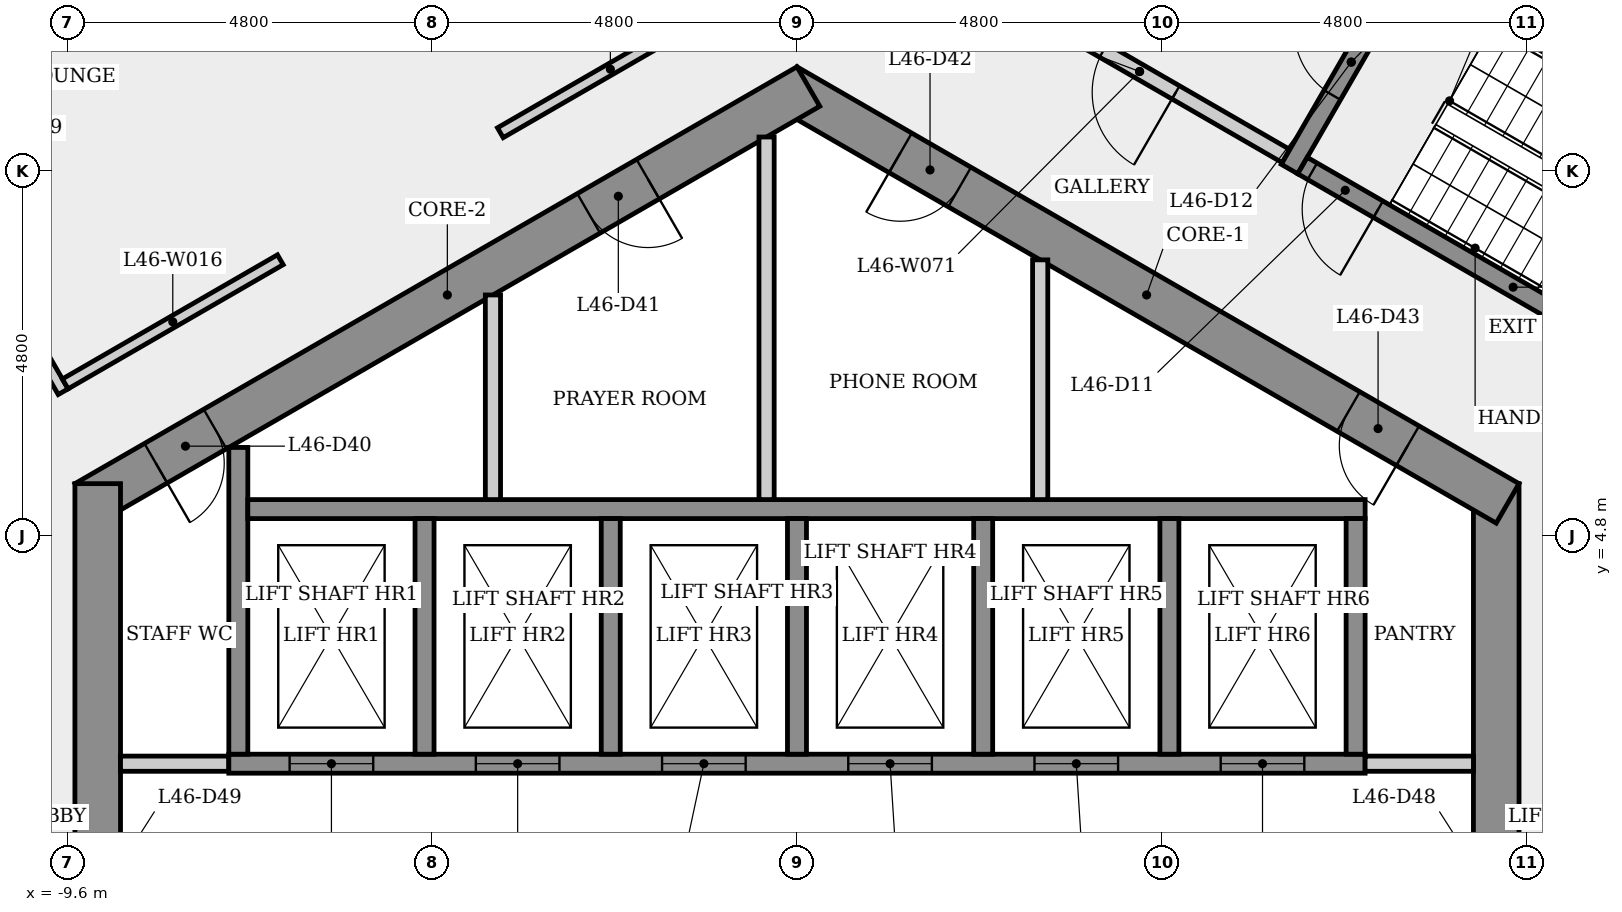
"""IFC4 building model, lengths in metres.
Left out: names, types, materials, properties, quantities, classifications, styles, units other than length and angle.
Written with IfcOpenShell. Run it as: python <this file> out.ifc"""

import sys

from ifc_helpers import new_model, si_unit, direction, frame, frame_2d, origin, place, context, subcontext, project, spatial, rectangle, extrude, element, fill, save


model = new_model("IFC4")
c1 = context("Model", 3, precision=1e-05, world=origin(), true_north=direction((0.0, 1.0)))
c2 = subcontext(c1, "Body", "Model", "MODEL_VIEW")
j1 = project(units=[si_unit("LENGTHUNIT", "METRE"), si_unit("PLANEANGLEUNIT", "RADIAN")], contexts=[c1])
p1 = place(None, origin())
s1 = spatial("IfcSite", under=j1, at=p1, CompositionType="ELEMENT")
p2 = place(p1, origin())
s2 = spatial("IfcBuilding", under=s1, at=p2, CompositionType="ELEMENT")
p3 = place(p2, frame((0.0, 0.0, 173.1)))
s3 = spatial("IfcBuildingStorey", under=s2, at=p3, CompositionType="ELEMENT", Elevation=173.1)
p4 = place(p3, frame((9.2, -5.485, 0.0), z_axis=(0.0, 0.0, 1.0), x_axis=(0.0, 1.0, 0.0)))
e1 = element("IfcWall", 1, at=p4, inside=s3, PredefinedType="SHEAR", context=c2, shape_type="SweptSolid", body=[
    extrude(rectangle(XDim=10.97, YDim=0.6, at=frame_2d((5.485, 0.0))), origin(), (0.0, 0.0, 1.0), 3.4),
])
p5 = place(p4, frame((4.685, 0.0, 0.0)))
e2 = element("IfcOpeningElement", 2, at=p5, cuts=e1, PredefinedType="OPENING", context=c2, shape_type="SweptSolid", body=[
    extrude(rectangle(XDim=1.6, YDim=2.1, at=frame_2d((0.8, 1.05))), frame((0.0, 0.31, 0.0), z_axis=(0.0, -1.0, 0.0), x_axis=(1.0, 0.0, 0.0)), (0.0, 0.0, 1.0), 0.62),
])
p6 = place(p3, frame((9.35, 5.225, 0.0), z_axis=(0.0, 0.0, 1.0), x_axis=(-0.866023993627, 0.500002442456, 0.0)))
e3 = element("IfcWall", 3, at=p6, inside=s3, PredefinedType="SHEAR", context=c2, shape_type="SweptSolid", body=[
    extrude(rectangle(XDim=10.97, YDim=0.6, at=frame_2d((5.485, 0.0))), origin(), (0.0, 0.0, 1.0), 3.4),
])
p7 = place(p6, frame((8.325, 0.0, 0.0)))
e4 = element("IfcOpeningElement", 4, at=p7, cuts=e3, PredefinedType="OPENING", context=c2, shape_type="SweptSolid", body=[
    extrude(rectangle(XDim=0.9, YDim=2.1, at=frame_2d((0.45, 1.05))), frame((0.0, 0.31, 0.0), z_axis=(0.0, -1.0, 0.0), x_axis=(1.0, 0.0, 0.0)), (0.0, 0.0, 1.0), 0.62),
])
p8 = place(p6, frame((1.518, 0.0, 0.0)))
e5 = element("IfcOpeningElement", 5, at=p8, cuts=e3, PredefinedType="OPENING", context=c2, shape_type="SweptSolid", body=[
    extrude(rectangle(XDim=0.9, YDim=2.1, at=frame_2d((0.45, 1.05))), frame((0.0, 0.31, 0.0), z_axis=(0.0, -1.0, 0.0), x_axis=(1.0, 0.0, 0.0)), (0.0, 0.0, 1.0), 0.62),
])
p9 = place(p3, frame((0.15, 10.71, 0.0), z_axis=(0.0, 0.0, 1.0), x_axis=(-0.866023993627, -0.500002442456, 0.0)))
e6 = element("IfcWall", 6, at=p9, inside=s3, PredefinedType="SHEAR", context=c2, shape_type="SweptSolid", body=[
    extrude(rectangle(XDim=10.97, YDim=0.6, at=frame_2d((5.485, 0.0))), origin(), (0.0, 0.0, 1.0), 3.4),
])
p10 = place(p9, frame((9.013, 0.0, 0.0)))
e7 = element("IfcOpeningElement", 7, at=p10, cuts=e6, PredefinedType="OPENING", context=c2, shape_type="SweptSolid", body=[
    extrude(rectangle(XDim=0.9, YDim=2.1, at=frame_2d((0.45, 1.05))), frame((0.0, 0.31, 0.0), z_axis=(0.0, -1.0, 0.0), x_axis=(1.0, 0.0, 0.0)), (0.0, 0.0, 1.0), 0.62),
])
p11 = place(p9, frame((2.437, 0.0, 0.0)))
e8 = element("IfcOpeningElement", 8, at=p11, cuts=e6, PredefinedType="OPENING", context=c2, shape_type="SweptSolid", body=[
    extrude(rectangle(XDim=0.9, YDim=2.1, at=frame_2d((0.45, 1.05))), frame((0.0, 0.31, 0.0), z_axis=(0.0, -1.0, 0.0), x_axis=(1.0, 0.0, 0.0)), (0.0, 0.0, 1.0), 0.62),
])
p12 = place(p3, frame((-9.2, 5.485, 0.0), z_axis=(0.0, 0.0, 1.0), x_axis=(0.0, -1.0, 0.0)))
e9 = element("IfcWall", 9, at=p12, inside=s3, PredefinedType="SHEAR", context=c2, shape_type="SweptSolid", body=[
    extrude(rectangle(XDim=10.97, YDim=0.6, at=frame_2d((5.485, 0.0))), origin(), (0.0, 0.0, 1.0), 3.4),
])
p13 = place(p12, frame((8.516, 0.0, 0.0)))
e10 = element("IfcOpeningElement", 10, at=p13, cuts=e9, PredefinedType="OPENING", context=c2, shape_type="SweptSolid", body=[
    extrude(rectangle(XDim=0.9, YDim=2.1, at=frame_2d((0.45, 1.05))), frame((0.0, 0.31, 0.0), z_axis=(0.0, -1.0, 0.0), x_axis=(1.0, 0.0, 0.0)), (0.0, 0.0, 1.0), 0.62),
])
p14 = place(p12, frame((4.685, 0.0, 0.0)))
e11 = element("IfcOpeningElement", 11, at=p14, cuts=e9, PredefinedType="OPENING", context=c2, shape_type="SweptSolid", body=[
    extrude(rectangle(XDim=1.6, YDim=2.1, at=frame_2d((0.8, 1.05))), frame((0.0, 0.31, 0.0), z_axis=(0.0, -1.0, 0.0), x_axis=(1.0, 0.0, 0.0)), (0.0, 0.0, 1.0), 0.62),
])
p15 = place(p3, frame((-12.17, 11.051, 0.0), z_axis=(0.0, 0.0, 1.0), x_axis=(0.500006713398, -0.866021527768, 0.0)))
e12 = element("IfcWall", 12, at=p15, inside=s3, PredefinedType="PARTITIONING", context=c2, shape_type="SweptSolid", body=[
    extrude(rectangle(XDim=5.031, YDim=0.15, at=frame_2d((2.515, 0.0))), origin(), (0.0, 0.0, 1.0), 3.05),
])
p16 = place(p15, frame((1.978, 0.0, 0.0)))
e13 = element("IfcOpeningElement", 13, at=p16, cuts=e12, PredefinedType="OPENING", context=c2, shape_type="SweptSolid", body=[
    extrude(rectangle(XDim=1.0, YDim=2.1, at=frame_2d((0.5, 1.05))), frame((0.0, 0.085, 0.0), z_axis=(0.0, -1.0, 0.0), x_axis=(1.0, 0.0, 0.0)), (0.0, 0.0, 1.0), 0.17),
])
p17 = place(p3, frame((-9.627, 6.797, 0.0), z_axis=(0.0, 0.0, 1.0), x_axis=(0.866013897511, 0.50001992892, 0.0)))
e14 = element("IfcWall", 14, at=p17, inside=s3, PredefinedType="PARTITIONING", context=c2, shape_type="SweptSolid", body=[
    extrude(rectangle(XDim=3.268, YDim=0.15, at=frame_2d((1.634, 0.0))), origin(), (0.0, 0.0, 1.0), 3.05),
])
p18 = place(p3, frame((-8.9, 1.8, 0.0), z_axis=(0.0, 0.0, 1.0), x_axis=(1.0, 0.0, 0.0)))
e15 = element("IfcWall", 15, at=p18, inside=s3, PredefinedType="PARTITIONING", context=c2, shape_type="SweptSolid", body=[
    extrude(rectangle(XDim=1.425, YDim=0.2, at=frame_2d((0.712, 0.0))), origin(), (0.0, 0.0, 1.0), 3.05),
])
p19 = place(p3, frame((-7.475, 1.8, 0.0), z_axis=(0.0, 0.0, 1.0), x_axis=(1.0, 0.0, 0.0)))
e16 = element("IfcWall", 16, at=p19, inside=s3, PredefinedType="SHEAR", context=c2, shape_type="SweptSolid", body=[
    extrude(rectangle(XDim=14.95, YDim=0.25, at=frame_2d((7.475, 0.0))), origin(), (0.0, 0.0, 1.0), 3.05),
])
p20 = place(p19, frame((0.8, 0.0, 0.0)))
e17 = element("IfcOpeningElement", 17, at=p20, cuts=e16, PredefinedType="OPENING", context=c2, shape_type="SweptSolid", body=[
    extrude(rectangle(XDim=1.1, YDim=2.1, at=frame_2d((0.55, 1.05))), frame((0.0, 0.135, 0.0), z_axis=(0.0, -1.0, 0.0), x_axis=(1.0, 0.0, 0.0)), (0.0, 0.0, 1.0), 0.27),
])
p21 = place(p19, frame((3.25, 0.0, 0.0)))
e18 = element("IfcOpeningElement", 18, at=p21, cuts=e16, PredefinedType="OPENING", context=c2, shape_type="SweptSolid", body=[
    extrude(rectangle(XDim=1.1, YDim=2.1, at=frame_2d((0.55, 1.05))), frame((0.0, 0.135, 0.0), z_axis=(0.0, -1.0, 0.0), x_axis=(1.0, 0.0, 0.0)), (0.0, 0.0, 1.0), 0.27),
])
p22 = place(p19, frame((5.7, 0.0, 0.0)))
e19 = element("IfcOpeningElement", 19, at=p22, cuts=e16, PredefinedType="OPENING", context=c2, shape_type="SweptSolid", body=[
    extrude(rectangle(XDim=1.1, YDim=2.1, at=frame_2d((0.55, 1.05))), frame((0.0, 0.135, 0.0), z_axis=(0.0, -1.0, 0.0), x_axis=(1.0, 0.0, 0.0)), (0.0, 0.0, 1.0), 0.27),
])
p23 = place(p19, frame((8.15, 0.0, 0.0)))
e20 = element("IfcOpeningElement", 20, at=p23, cuts=e16, PredefinedType="OPENING", context=c2, shape_type="SweptSolid", body=[
    extrude(rectangle(XDim=1.1, YDim=2.1, at=frame_2d((0.55, 1.05))), frame((0.0, 0.135, 0.0), z_axis=(0.0, -1.0, 0.0), x_axis=(1.0, 0.0, 0.0)), (0.0, 0.0, 1.0), 0.27),
])
p24 = place(p19, frame((10.6, 0.0, 0.0)))
e21 = element("IfcOpeningElement", 21, at=p24, cuts=e16, PredefinedType="OPENING", context=c2, shape_type="SweptSolid", body=[
    extrude(rectangle(XDim=1.1, YDim=2.1, at=frame_2d((0.55, 1.05))), frame((0.0, 0.135, 0.0), z_axis=(0.0, -1.0, 0.0), x_axis=(1.0, 0.0, 0.0)), (0.0, 0.0, 1.0), 0.27),
])
p25 = place(p19, frame((13.05, 0.0, 0.0)))
e22 = element("IfcOpeningElement", 22, at=p25, cuts=e16, PredefinedType="OPENING", context=c2, shape_type="SweptSolid", body=[
    extrude(rectangle(XDim=1.1, YDim=2.1, at=frame_2d((0.55, 1.05))), frame((0.0, 0.135, 0.0), z_axis=(0.0, -1.0, 0.0), x_axis=(1.0, 0.0, 0.0)), (0.0, 0.0, 1.0), 0.27),
])
p26 = place(p3, frame((-7.35, 1.925, 0.0), z_axis=(0.0, 0.0, 1.0), x_axis=(0.0, 1.0, 0.0)))
e23 = element("IfcWall", 23, at=p26, inside=s3, PredefinedType="SHEAR", context=c2, shape_type="SweptSolid", body=[
    extrude(rectangle(XDim=4.036, YDim=0.25, at=frame_2d((2.018, 0.0))), origin(), (0.0, 0.0, 1.0), 3.05),
])
p27 = place(p3, frame((-7.225, 5.15, 0.0), z_axis=(0.0, 0.0, 1.0), x_axis=(1.0, 0.0, 0.0)))
e24 = element("IfcWall", 24, at=p27, inside=s3, PredefinedType="SHEAR", context=c2, shape_type="SweptSolid", body=[
    extrude(rectangle(XDim=14.7, YDim=0.25, at=frame_2d((7.35, 0.0))), origin(), (0.0, 0.0, 1.0), 3.05),
])
p28 = place(p3, frame((-4.9, 5.025, 0.0), z_axis=(0.0, 0.0, 1.0), x_axis=(0.0, -1.0, 0.0)))
e25 = element("IfcWall", 25, at=p28, inside=s3, PredefinedType="SHEAR", context=c2, shape_type="SweptSolid", body=[
    extrude(rectangle(XDim=3.1, YDim=0.25, at=frame_2d((1.55, 0.0))), origin(), (0.0, 0.0, 1.0), 3.4),
])
p29 = place(p3, frame((-4.0, 7.967, 0.0), z_axis=(0.0, 0.0, 1.0), x_axis=(0.0, -1.0, 0.0)))
e26 = element("IfcWall", 26, at=p29, inside=s3, PredefinedType="PARTITIONING", context=c2, shape_type="SweptSolid", body=[
    extrude(rectangle(XDim=2.692, YDim=0.2, at=frame_2d((1.346, 0.0))), origin(), (0.0, 0.0, 1.0), 3.05),
])
p30 = place(p3, frame((-3.903, 10.102, 0.0), z_axis=(0.0, 0.0, 1.0), x_axis=(0.866000720478, 0.500042750305, 0.0)))
e27 = element("IfcWall", 27, at=p30, inside=s3, PredefinedType="PARTITIONING", context=c2, shape_type="SweptSolid", body=[
    extrude(rectangle(XDim=3.343, YDim=0.15, at=frame_2d((1.671, 0.0))), origin(), (0.0, 0.0, 1.0), 3.05),
])
p31 = place(p3, frame((-2.45, 5.025, 0.0), z_axis=(0.0, 0.0, 1.0), x_axis=(0.0, -1.0, 0.0)))
e28 = element("IfcWall", 28, at=p31, inside=s3, PredefinedType="SHEAR", context=c2, shape_type="SweptSolid", body=[
    extrude(rectangle(XDim=3.1, YDim=0.25, at=frame_2d((1.55, 0.0))), origin(), (0.0, 0.0, 1.0), 3.4),
])
p32 = place(p3, frame((-0.4, 10.046, 0.0), z_axis=(0.0, 0.0, 1.0), x_axis=(0.0, -1.0, 0.0)))
e29 = element("IfcWall", 29, at=p32, inside=s3, PredefinedType="PARTITIONING", context=c2, shape_type="SweptSolid", body=[
    extrude(rectangle(XDim=4.771, YDim=0.2, at=frame_2d((2.385, 0.0))), origin(), (0.0, 0.0, 1.0), 3.05),
])
for number, where, z_axis, x_axis in (
    (30, (0.0, 5.025, 0.0), (0.0, 0.0, 1.0), (0.0, -1.0, 0.0)),
    (31, (2.45, 5.025, 0.0), (0.0, 0.0, 1.0), (0.0, -1.0, 0.0)),
):
    element("IfcWall", number, at=place(p3, frame(where, z_axis=z_axis, x_axis=x_axis)), inside=s3, PredefinedType="SHEAR", context=c2, shape_type="SweptSolid", body=[
        extrude(rectangle(XDim=3.1, YDim=0.25, at=frame_2d((1.55, 0.0))), origin(), (0.0, 0.0, 1.0), 3.4),
    ])
p33 = place(p3, frame((3.2, 8.429, 0.0), z_axis=(0.0, 0.0, 1.0), x_axis=(0.0, -1.0, 0.0)))
e32 = element("IfcWall", 32, at=p33, inside=s3, PredefinedType="PARTITIONING", context=c2, shape_type="SweptSolid", body=[
    extrude(rectangle(XDim=3.154, YDim=0.2, at=frame_2d((1.577, 0.0))), origin(), (0.0, 0.0, 1.0), 3.05),
])
p34 = place(p3, frame((4.9, 5.025, 0.0), z_axis=(0.0, 0.0, 1.0), x_axis=(0.0, -1.0, 0.0)))
e33 = element("IfcWall", 33, at=p34, inside=s3, PredefinedType="SHEAR", context=c2, shape_type="SweptSolid", body=[
    extrude(rectangle(XDim=3.1, YDim=0.25, at=frame_2d((1.55, 0.0))), origin(), (0.0, 0.0, 1.0), 3.4),
])
p35 = place(p3, frame((6.435, 9.795, 0.0), z_axis=(0.0, 0.0, 1.0), x_axis=(-0.866012907634, 0.500021643343, 0.0)))
e34 = element("IfcWall", 34, at=p35, inside=s3, PredefinedType="PARTITIONING", context=c2, shape_type="SweptSolid", body=[
    extrude(rectangle(XDim=4.45, YDim=0.2, at=frame_2d((2.225, 0.0))), origin(), (0.0, 0.0, 1.0), 3.05),
])
p36 = place(p35, frame((1.675, 0.0, 0.0)))
e35 = element("IfcOpeningElement", 35, at=p36, cuts=e34, PredefinedType="OPENING", context=c2, shape_type="SweptSolid", body=[
    extrude(rectangle(XDim=1.1, YDim=2.1, at=frame_2d((0.55, 1.05))), frame((0.0, 0.11, 0.0), z_axis=(0.0, -1.0, 0.0), x_axis=(1.0, 0.0, 0.0)), (0.0, 0.0, 1.0), 0.22),
])
p37 = place(p3, frame((6.48, 9.624, 0.0), z_axis=(0.0, 0.0, 1.0), x_axis=(0.500017246033, 0.866015446554, 0.0)))
e36 = element("IfcWall", 36, at=p37, inside=s3, PredefinedType="SHEAR", context=c2, shape_type="SweptSolid", body=[
    extrude(rectangle(XDim=3.25, YDim=0.25, at=frame_2d((1.625, 0.0))), origin(), (0.0, 0.0, 1.0), 3.05),
])
p38 = place(p37, frame((1.125, 0.0, 0.0)))
e37 = element("IfcOpeningElement", 37, at=p38, cuts=e36, PredefinedType="OPENING", context=c2, shape_type="SweptSolid", body=[
    extrude(rectangle(XDim=1.0, YDim=2.1, at=frame_2d((0.5, 1.05))), frame((0.0, 0.135, 0.0), z_axis=(0.0, -1.0, 0.0), x_axis=(1.0, 0.0, 0.0)), (0.0, 0.0, 1.0), 0.27),
])
p39 = place(p3, frame((7.475, 1.8, 0.0), z_axis=(0.0, 0.0, 1.0), x_axis=(1.0, 0.0, 0.0)))
e38 = element("IfcWall", 38, at=p39, inside=s3, PredefinedType="PARTITIONING", context=c2, shape_type="SweptSolid", body=[
    extrude(rectangle(XDim=1.425, YDim=0.2, at=frame_2d((0.712, 0.0))), origin(), (0.0, 0.0, 1.0), 3.05),
])
p40 = place(p3, frame((7.35, 5.025, 0.0), z_axis=(0.0, 0.0, 1.0), x_axis=(0.0, -1.0, 0.0)))
e39 = element("IfcWall", 39, at=p40, inside=s3, PredefinedType="SHEAR", context=c2, shape_type="SweptSolid", body=[
    extrude(rectangle(XDim=3.1, YDim=0.25, at=frame_2d((1.55, 0.0))), origin(), (0.0, 0.0, 1.0), 3.4),
])
p41 = place(p3, frame((8.151, 12.268, 0.0), z_axis=(0.0, 0.0, 1.0), x_axis=(0.866025499775, -0.499999833739, 0.0)))
e40 = element("IfcWall", 40, at=p41, inside=s3, PredefinedType="SHEAR", context=c2, shape_type="SweptSolid", body=[
    extrude(rectangle(XDim=6.4, YDim=0.25, at=frame_2d((3.2, 0.0))), origin(), (0.0, 0.0, 1.0), 3.05),
])
p42 = place(p3, frame((12.194, 6.47, 0.0), z_axis=(0.0, 0.0, 1.0), x_axis=(-0.866025499775, 0.499999833739, 0.0)))
e41 = element("IfcWall", 41, at=p42, inside=s3, PredefinedType="SHEAR", context=c2, shape_type="SweptSolid", body=[
    extrude(rectangle(XDim=6.4, YDim=0.25, at=frame_2d((3.2, 0.0))), origin(), (0.0, 0.0, 1.0), 3.05),
])
p43 = place(p42, frame((5.25, 0.0, 0.0)))
e42 = element("IfcOpeningElement", 42, at=p43, cuts=e41, PredefinedType="OPENING", context=c2, shape_type="SweptSolid", body=[
    extrude(rectangle(XDim=1.0, YDim=2.1, at=frame_2d((0.5, 1.05))), frame((0.0, 0.135, 0.0), z_axis=(0.0, -1.0, 0.0), x_axis=(1.0, 0.0, 0.0)), (0.0, 0.0, 1.0), 0.27),
])
p44 = place(p20, origin())
e43 = element("IfcDoor", 43, at=p44, inside=s3, OperationType="SLIDING_TO_LEFT", PredefinedType="DOOR", context=c2, shape_type="SweptSolid", body=[
    extrude(rectangle(XDim=1.1, YDim=2.1, at=frame_2d((0.55, 1.05))), frame((0.0, 0.025, 0.0), z_axis=(0.0, -1.0, 0.0), x_axis=(1.0, 0.0, 0.0)), (0.0, 0.0, 1.0), 0.05),
])
fill(e17, e43)
p45 = place(p21, origin())
e44 = element("IfcDoor", 44, at=p45, inside=s3, OperationType="SLIDING_TO_LEFT", PredefinedType="DOOR", context=c2, shape_type="SweptSolid", body=[
    extrude(rectangle(XDim=1.1, YDim=2.1, at=frame_2d((0.55, 1.05))), frame((0.0, 0.025, 0.0), z_axis=(0.0, -1.0, 0.0), x_axis=(1.0, 0.0, 0.0)), (0.0, 0.0, 1.0), 0.05),
])
fill(e18, e44)
p46 = place(p22, origin())
e45 = element("IfcDoor", 45, at=p46, inside=s3, OperationType="SLIDING_TO_LEFT", PredefinedType="DOOR", context=c2, shape_type="SweptSolid", body=[
    extrude(rectangle(XDim=1.1, YDim=2.1, at=frame_2d((0.55, 1.05))), frame((0.0, 0.025, 0.0), z_axis=(0.0, -1.0, 0.0), x_axis=(1.0, 0.0, 0.0)), (0.0, 0.0, 1.0), 0.05),
])
fill(e19, e45)
p47 = place(p23, origin())
e46 = element("IfcDoor", 46, at=p47, inside=s3, OperationType="SLIDING_TO_LEFT", PredefinedType="DOOR", context=c2, shape_type="SweptSolid", body=[
    extrude(rectangle(XDim=1.1, YDim=2.1, at=frame_2d((0.55, 1.05))), frame((0.0, 0.025, 0.0), z_axis=(0.0, -1.0, 0.0), x_axis=(1.0, 0.0, 0.0)), (0.0, 0.0, 1.0), 0.05),
])
fill(e20, e46)
p48 = place(p24, origin())
e47 = element("IfcDoor", 47, at=p48, inside=s3, OperationType="SLIDING_TO_LEFT", PredefinedType="DOOR", context=c2, shape_type="SweptSolid", body=[
    extrude(rectangle(XDim=1.1, YDim=2.1, at=frame_2d((0.55, 1.05))), frame((0.0, 0.025, 0.0), z_axis=(0.0, -1.0, 0.0), x_axis=(1.0, 0.0, 0.0)), (0.0, 0.0, 1.0), 0.05),
])
fill(e21, e47)
p49 = place(p25, origin())
e48 = element("IfcDoor", 48, at=p49, inside=s3, OperationType="SLIDING_TO_LEFT", PredefinedType="DOOR", context=c2, shape_type="SweptSolid", body=[
    extrude(rectangle(XDim=1.1, YDim=2.1, at=frame_2d((0.55, 1.05))), frame((0.0, 0.025, 0.0), z_axis=(0.0, -1.0, 0.0), x_axis=(1.0, 0.0, 0.0)), (0.0, 0.0, 1.0), 0.05),
])
fill(e22, e48)
p50 = place(p43, origin())
e49 = element("IfcDoor", 49, at=p50, inside=s3, OperationType="SINGLE_SWING_LEFT", PredefinedType="DOOR", context=c2, shape_type="SweptSolid", body=[
    extrude(rectangle(XDim=1.0, YDim=2.1, at=frame_2d((0.5, 1.05))), frame((0.0, 0.025, 0.0), z_axis=(0.0, -1.0, 0.0), x_axis=(1.0, 0.0, 0.0)), (0.0, 0.0, 1.0), 0.05),
])
fill(e42, e49)
p51 = place(p38, origin())
e50 = element("IfcDoor", 50, at=p51, inside=s3, OperationType="SINGLE_SWING_RIGHT", PredefinedType="DOOR", context=c2, shape_type="SweptSolid", body=[
    extrude(rectangle(XDim=1.0, YDim=2.1, at=frame_2d((0.5, 1.05))), frame((0.0, 0.025, 0.0), z_axis=(0.0, -1.0, 0.0), x_axis=(1.0, 0.0, 0.0)), (0.0, 0.0, 1.0), 0.05),
])
fill(e37, e50)
p52 = place(p36, origin())
e51 = element("IfcDoor", 51, at=p52, inside=s3, OperationType="SINGLE_SWING_LEFT", PredefinedType="DOOR", context=c2, shape_type="SweptSolid", body=[
    extrude(rectangle(XDim=1.1, YDim=2.1, at=frame_2d((0.55, 1.05))), frame((0.0, 0.025, 0.0), z_axis=(0.0, -1.0, 0.0), x_axis=(1.0, 0.0, 0.0)), (0.0, 0.0, 1.0), 0.05),
])
fill(e35, e51)
p53 = place(p10, origin())
e52 = element("IfcDoor", 52, at=p53, inside=s3, OperationType="SINGLE_SWING_RIGHT", PredefinedType="DOOR", context=c2, shape_type="SweptSolid", body=[
    extrude(rectangle(XDim=0.9, YDim=2.1, at=frame_2d((0.45, 1.05))), frame((0.0, 0.025, 0.0), z_axis=(0.0, -1.0, 0.0), x_axis=(1.0, 0.0, 0.0)), (0.0, 0.0, 1.0), 0.05),
])
fill(e7, e52)
p54 = place(p11, origin())
e53 = element("IfcDoor", 53, at=p54, inside=s3, OperationType="SINGLE_SWING_LEFT", PredefinedType="DOOR", context=c2, shape_type="SweptSolid", body=[
    extrude(rectangle(XDim=0.9, YDim=2.1, at=frame_2d((0.45, 1.05))), frame((0.0, 0.025, 0.0), z_axis=(0.0, -1.0, 0.0), x_axis=(1.0, 0.0, 0.0)), (0.0, 0.0, 1.0), 0.05),
])
fill(e8, e53)
p55 = place(p7, origin())
e54 = element("IfcDoor", 54, at=p55, inside=s3, OperationType="SINGLE_SWING_RIGHT", PredefinedType="DOOR", context=c2, shape_type="SweptSolid", body=[
    extrude(rectangle(XDim=0.9, YDim=2.1, at=frame_2d((0.45, 1.05))), frame((0.0, 0.025, 0.0), z_axis=(0.0, -1.0, 0.0), x_axis=(1.0, 0.0, 0.0)), (0.0, 0.0, 1.0), 0.05),
])
fill(e4, e54)
p56 = place(p8, origin())
e55 = element("IfcDoor", 55, at=p56, inside=s3, OperationType="SINGLE_SWING_LEFT", PredefinedType="DOOR", context=c2, shape_type="SweptSolid", body=[
    extrude(rectangle(XDim=0.9, YDim=2.1, at=frame_2d((0.45, 1.05))), frame((0.0, 0.025, 0.0), z_axis=(0.0, -1.0, 0.0), x_axis=(1.0, 0.0, 0.0)), (0.0, 0.0, 1.0), 0.05),
])
fill(e5, e55)
save(model, sys.argv[1])
